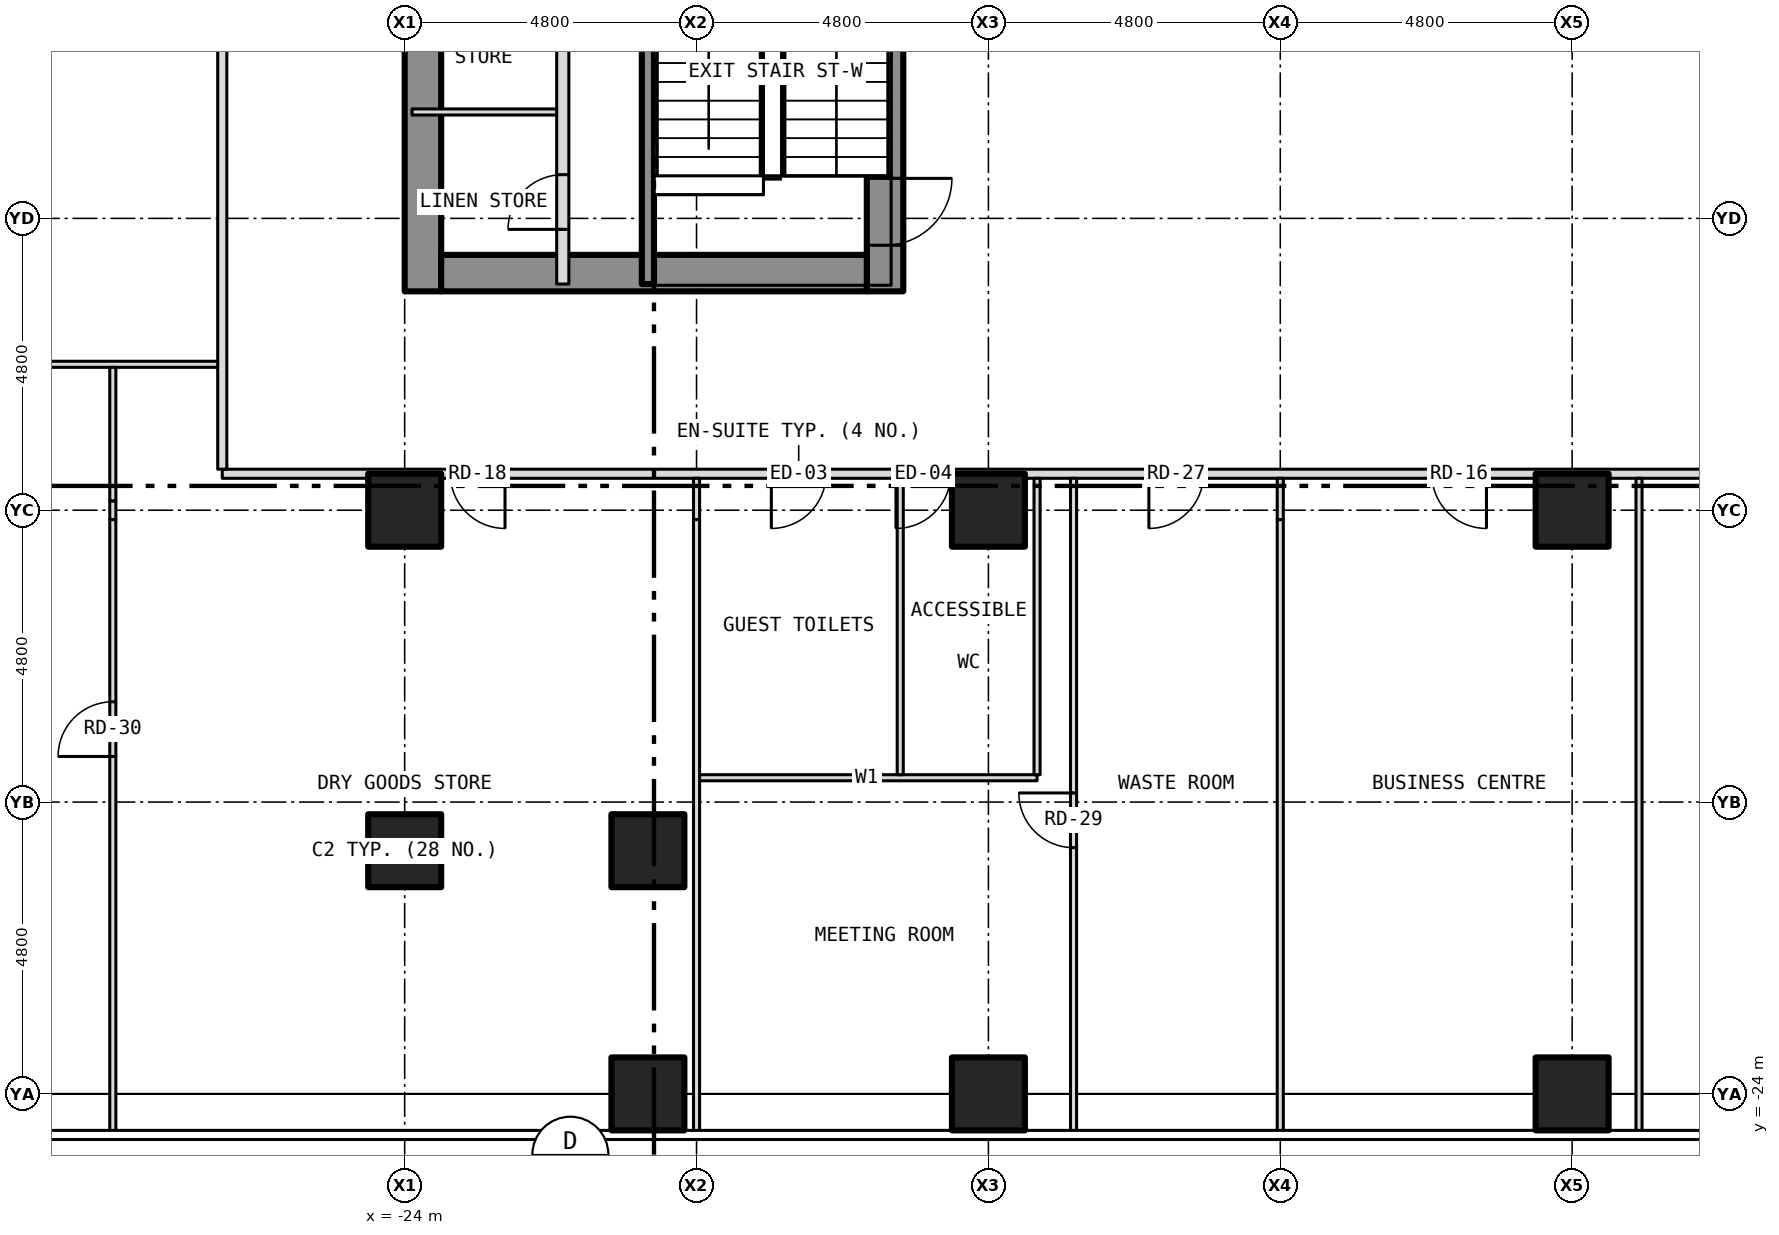
"""IFC4 building model, lengths in metres.
Left out: names, types, materials, properties, quantities, classifications, styles, units other than length and angle.
Written with IfcOpenShell. Run it as: python <this file> out.ifc"""

import sys

from ifc_helpers import new_model, si_unit, direction, frame, frame_2d, origin, origin_2d, place, context, subcontext, project, spatial, rectangle, hollow_rectangle, extrude, element, fill, save


model = new_model("IFC4")
c1 = context("Model", 3, precision=1e-05, world=origin(), true_north=direction((0.0, 1.0)))
c2 = subcontext(c1, "Body", "Model", "MODEL_VIEW")
j1 = project(units=[si_unit("LENGTHUNIT", "METRE"), si_unit("PLANEANGLEUNIT", "RADIAN")], contexts=[c1])
p1 = place(None, origin())
s1 = spatial("IfcSite", under=j1, at=p1, CompositionType="ELEMENT")
p2 = place(p1, origin())
s2 = spatial("IfcBuilding", under=s1, at=p2, CompositionType="ELEMENT")
p3 = place(p2, frame((0.0, 0.0, 7.5)))
s3 = spatial("IfcBuildingStorey", under=s2, at=p3, CompositionType="ELEMENT", Elevation=7.5)
for number, where, z_axis, x_axis in (
    (1, (-20.0, -24.0, -0.25), (0.0, 0.0, 1.0), (1.0, 0.0, 0.0)),
    (2, (-14.4, -24.0, -0.25), (0.0, 0.0, 1.0), (1.0, 0.0, 0.0)),
    (3, (-4.8, -24.0, -0.25), (0.0, 0.0, 1.0), (1.0, 0.0, 0.0)),
    (4, (-24.0, -20.0, -0.25), (0.0, 0.0, 1.0), (1.0, 0.0, 0.0)),
    (5, (-24.0, -14.4, -0.25), (0.0, 0.0, 1.0), (1.0, 0.0, 0.0)),
    (6, (-20.0, -20.0, -0.25), (0.0, 0.0, 1.0), (1.0, 0.0, 0.0)),
    (7, (-14.4, -14.4, -0.25), (0.0, 0.0, 1.0), (1.0, 0.0, 0.0)),
    (8, (-4.8, -14.4, -0.25), (0.0, 0.0, 1.0), (1.0, 0.0, 0.0)),
):
    element("IfcColumn", number, at=place(p3, frame(where, z_axis=z_axis, x_axis=x_axis)), inside=s3, PredefinedType="COLUMN", context=c2, shape_type="SweptSolid", body=[
        extrude(hollow_rectangle(XDim=1.2, YDim=1.2, WallThickness=0.07, at=origin_2d()), origin(), (0.0, 0.0, 1.0), 8.05),
    ])
p4 = place(p3, frame((-16.1, -10.8, 0.0), z_axis=(0.0, 0.0, 1.0), x_axis=(0.0, 1.0, 0.0)))
e9 = element("IfcWall", 9, at=p4, inside=s3, PredefinedType="SHEAR", context=c2, shape_type="SweptSolid", body=[
    extrude(rectangle(XDim=21.6, YDim=0.6, at=frame_2d((10.8, 0.0))), origin(), (0.0, 0.0, 1.0), 7.7),
])
p5 = place(p4, frame((9.4, 0.0, 0.0)))
e10 = element("IfcOpeningElement", 10, at=p5, cuts=e9, PredefinedType="OPENING", context=c2, shape_type="SweptSolid", body=[
    extrude(rectangle(XDim=1.1, YDim=2.1, at=frame_2d((0.55, 1.05))), frame((0.0, 0.312, 0.0), z_axis=(0.0, -1.0, 0.0), x_axis=(1.0, 0.0, 0.0)), (0.0, 0.0, 1.0), 0.624),
])
p6 = place(p4, frame((11.5, 0.0, 0.0)))
e11 = element("IfcOpeningElement", 11, at=p6, cuts=e9, PredefinedType="OPENING", context=c2, shape_type="SweptSolid", body=[
    extrude(rectangle(XDim=1.1, YDim=2.1, at=frame_2d((0.55, 1.05))), frame((0.0, 0.312, 0.0), z_axis=(0.0, -1.0, 0.0), x_axis=(1.0, 0.0, 0.0)), (0.0, 0.0, 1.0), 0.624),
])
p7 = place(p4, frame((13.6, 0.0, 0.0)))
e12 = element("IfcOpeningElement", 12, at=p7, cuts=e9, PredefinedType="OPENING", context=c2, shape_type="SweptSolid", body=[
    extrude(rectangle(XDim=1.1, YDim=2.1, at=frame_2d((0.55, 1.05))), frame((0.0, 0.312, 0.0), z_axis=(0.0, -1.0, 0.0), x_axis=(1.0, 0.0, 0.0)), (0.0, 0.0, 1.0), 0.624),
])
p8 = place(p4, frame((15.7, 0.0, 0.0)))
e13 = element("IfcOpeningElement", 13, at=p8, cuts=e9, PredefinedType="OPENING", context=c2, shape_type="SweptSolid", body=[
    extrude(rectangle(XDim=1.1, YDim=2.1, at=frame_2d((0.55, 1.05))), frame((0.0, 0.312, 0.0), z_axis=(0.0, -1.0, 0.0), x_axis=(1.0, 0.0, 0.0)), (0.0, 0.0, 1.0), 0.624),
])
p9 = place(p4, frame((17.8, 0.0, 0.0)))
e14 = element("IfcOpeningElement", 14, at=p9, cuts=e9, PredefinedType="OPENING", context=c2, shape_type="SweptSolid", body=[
    extrude(rectangle(XDim=1.1, YDim=2.1, at=frame_2d((0.55, 1.05))), frame((0.0, 0.312, 0.0), z_axis=(0.0, -1.0, 0.0), x_axis=(1.0, 0.0, 0.0)), (0.0, 0.0, 1.0), 0.624),
])
p10 = place(p4, frame((0.758, 0.0, 0.0)))
e15 = element("IfcOpeningElement", 15, at=p10, cuts=e9, PredefinedType="OPENING", context=c2, shape_type="SweptSolid", body=[
    extrude(rectangle(XDim=1.1, YDim=2.1, at=frame_2d((0.55, 1.05))), frame((0.0, 0.312, 0.0), z_axis=(0.0, -1.0, 0.0), x_axis=(1.0, 0.0, 0.0)), (0.0, 0.0, 1.0), 0.624),
])
p11 = place(p4, frame((7.5, 0.0, 0.0)))
e16 = element("IfcOpeningElement", 16, at=p11, cuts=e9, PredefinedType="OPENING", context=c2, shape_type="SweptSolid", body=[
    extrude(rectangle(XDim=1.1, YDim=2.1, at=frame_2d((0.55, 1.05))), frame((0.0, 0.312, 0.0), z_axis=(0.0, -1.0, 0.0), x_axis=(1.0, 0.0, 0.0)), (0.0, 0.0, 1.0), 0.624),
])
p12 = place(p3, frame((-23.7, -10.8, 0.0), z_axis=(0.0, 0.0, 1.0), x_axis=(0.0, 1.0, 0.0)))
e17 = element("IfcWall", 17, at=p12, inside=s3, PredefinedType="SHEAR", context=c2, shape_type="SweptSolid", body=[
    extrude(rectangle(XDim=21.6, YDim=0.6, at=frame_2d((10.8, 0.0))), origin(), (0.0, 0.0, 1.0), 7.7),
])
p13 = place(p3, frame((-23.4, -10.5, 0.0), z_axis=(0.0, 0.0, 1.0), x_axis=(1.0, 0.0, 0.0)))
e18 = element("IfcWall", 18, at=p13, inside=s3, PredefinedType="SHEAR", context=c2, shape_type="SweptSolid", body=[
    extrude(rectangle(XDim=7.0, YDim=0.6, at=frame_2d((3.5, 0.0))), origin(), (0.0, 0.0, 1.0), 7.7),
])
p14 = place(p3, frame((-19.2, -18.8, 0.0), z_axis=(0.0, 0.0, 1.0), x_axis=(1.0, 0.0, 0.0)))
e19 = element("IfcWall", 19, at=p14, inside=s3, PredefinedType="PARTITIONING", context=c2, shape_type="SweptSolid", body=[
    extrude(rectangle(XDim=5.6, YDim=0.1, at=frame_2d((2.8, 0.0))), origin(), (0.0, 0.0, 1.0), 7.8),
])
p15 = place(p3, frame((-27.0, -13.8, 0.0), z_axis=(0.0, 0.0, 1.0), x_axis=(1.0, 0.0, 0.0)))
e20 = element("IfcWall", 20, at=p15, inside=s3, PredefinedType="PARTITIONING", context=c2, shape_type="SweptSolid", body=[
    extrude(rectangle(XDim=54.0, YDim=0.15, at=frame_2d((27.0, 0.0))), origin(), (0.0, 0.0, 1.0), 7.8),
])
p16 = place(p15, frame((9.03, 0.0, 0.0)))
e21 = element("IfcOpeningElement", 21, at=p16, cuts=e20, PredefinedType="OPENING", context=c2, shape_type="SweptSolid", body=[
    extrude(rectangle(XDim=0.9, YDim=2.1, at=frame_2d((0.45, 1.05))), frame((0.0, 0.087, 0.0), z_axis=(0.0, -1.0, 0.0), x_axis=(1.0, 0.0, 0.0)), (0.0, 0.0, 1.0), 0.174),
])
p17 = place(p15, frame((11.08, 0.0, 0.0)))
e22 = element("IfcOpeningElement", 22, at=p17, cuts=e20, PredefinedType="OPENING", context=c2, shape_type="SweptSolid", body=[
    extrude(rectangle(XDim=0.9, YDim=2.1, at=frame_2d((0.45, 1.05))), frame((0.0, 0.087, 0.0), z_axis=(0.0, -1.0, 0.0), x_axis=(1.0, 0.0, 0.0)), (0.0, 0.0, 1.0), 0.174),
])
p18 = place(p15, frame((19.891, 0.0, 0.0)))
e23 = element("IfcOpeningElement", 23, at=p18, cuts=e20, PredefinedType="OPENING", context=c2, shape_type="SweptSolid", body=[
    extrude(rectangle(XDim=0.9, YDim=2.1, at=frame_2d((0.45, 1.05))), frame((0.0, 0.087, 0.0), z_axis=(0.0, -1.0, 0.0), x_axis=(1.0, 0.0, 0.0)), (0.0, 0.0, 1.0), 0.174),
])
p19 = place(p15, frame((30.274, 0.0, 0.0)))
e24 = element("IfcOpeningElement", 24, at=p19, cuts=e20, PredefinedType="OPENING", context=c2, shape_type="SweptSolid", body=[
    extrude(rectangle(XDim=0.9, YDim=2.1, at=frame_2d((0.45, 1.05))), frame((0.0, 0.087, 0.0), z_axis=(0.0, -1.0, 0.0), x_axis=(1.0, 0.0, 0.0)), (0.0, 0.0, 1.0), 0.174),
])
p20 = place(p15, frame((3.75, 0.0, 0.0)))
e25 = element("IfcOpeningElement", 25, at=p20, cuts=e20, PredefinedType="OPENING", context=c2, shape_type="SweptSolid", body=[
    extrude(rectangle(XDim=0.9, YDim=2.1, at=frame_2d((0.45, 1.05))), frame((0.0, 0.087, 0.0), z_axis=(0.0, -1.0, 0.0), x_axis=(1.0, 0.0, 0.0)), (0.0, 0.0, 1.0), 0.174),
])
p21 = place(p15, frame((49.35, 0.0, 0.0)))
e26 = element("IfcOpeningElement", 26, at=p21, cuts=e20, PredefinedType="OPENING", context=c2, shape_type="SweptSolid", body=[
    extrude(rectangle(XDim=0.9, YDim=2.1, at=frame_2d((0.45, 1.05))), frame((0.0, 0.087, 0.0), z_axis=(0.0, -1.0, 0.0), x_axis=(1.0, 0.0, 0.0)), (0.0, 0.0, 1.0), 0.174),
])
p22 = place(p15, frame((42.15, 0.0, 0.0)))
e27 = element("IfcOpeningElement", 27, at=p22, cuts=e20, PredefinedType="OPENING", context=c2, shape_type="SweptSolid", body=[
    extrude(rectangle(XDim=0.9, YDim=2.1, at=frame_2d((0.45, 1.05))), frame((0.0, 0.087, 0.0), z_axis=(0.0, -1.0, 0.0), x_axis=(1.0, 0.0, 0.0)), (0.0, 0.0, 1.0), 0.174),
])
p23 = place(p15, frame((15.239, 0.0, 0.0)))
e28 = element("IfcOpeningElement", 28, at=p23, cuts=e20, PredefinedType="OPENING", context=c2, shape_type="SweptSolid", body=[
    extrude(rectangle(XDim=0.9, YDim=2.1, at=frame_2d((0.45, 1.05))), frame((0.0, 0.087, 0.0), z_axis=(0.0, -1.0, 0.0), x_axis=(1.0, 0.0, 0.0)), (0.0, 0.0, 1.0), 0.174),
])
p24 = place(p3, frame((-38.28, -12.0, 0.0), z_axis=(0.0, 0.0, 1.0), x_axis=(1.0, 0.0, 0.0)))
e29 = element("IfcWall", 29, at=p24, inside=s3, PredefinedType="PARTITIONING", context=c2, shape_type="SweptSolid", body=[
    extrude(rectangle(XDim=11.28, YDim=0.1, at=frame_2d((5.64, 0.0))), origin(), (0.0, 0.0, 1.0), 7.8),
])
p25 = place(p3, frame((-23.88, -7.85, 0.0), z_axis=(0.0, 0.0, 1.0), x_axis=(1.0, 0.0, 0.0)))
e30 = element("IfcWall", 30, at=p25, inside=s3, PredefinedType="PARTITIONING", context=c2, shape_type="SweptSolid", body=[
    extrude(rectangle(XDim=2.48, YDim=0.1, at=frame_2d((1.24, 0.0))), origin(), (0.0, 0.0, 1.0), 7.7),
])
p26 = place(p3, frame((-28.8, -24.63, 0.0), z_axis=(0.0, 0.0, 1.0), x_axis=(0.0, 1.0, 0.0)))
e31 = element("IfcWall", 31, at=p26, inside=s3, PredefinedType="PARTITIONING", context=c2, shape_type="SweptSolid", body=[
    extrude(rectangle(XDim=10.076, YDim=0.1, at=frame_2d((5.038, 0.0))), origin(), (0.0, 0.0, 1.0), 7.183),
])
p27 = place(p26, frame((6.18, 0.0, 0.0)))
e32 = element("IfcOpeningElement", 32, at=p27, cuts=e31, PredefinedType="OPENING", context=c2, shape_type="SweptSolid", body=[
    extrude(rectangle(XDim=0.9, YDim=2.1, at=frame_2d((0.45, 1.05))), frame((0.0, 0.062, 0.0), z_axis=(0.0, -1.0, 0.0), x_axis=(1.0, 0.0, 0.0)), (0.0, 0.0, 1.0), 0.124),
])
p28 = place(p3, frame((-28.8, -14.554, 0.0), z_axis=(0.0, 0.0, 1.0), x_axis=(0.0, 1.0, 0.0)))
e33 = element("IfcWall", 33, at=p28, inside=s3, PredefinedType="PARTITIONING", context=c2, shape_type="SweptSolid", body=[
    extrude(rectangle(XDim=0.308, YDim=0.1, at=frame_2d((0.154, 0.0))), origin(), (0.0, 0.0, 1.0), 7.8),
])
p29 = place(p3, frame((-28.8, -14.246, 0.0), z_axis=(0.0, 0.0, 1.0), x_axis=(0.0, 1.0, 0.0)))
e34 = element("IfcWall", 34, at=p29, inside=s3, PredefinedType="PARTITIONING", context=c2, shape_type="SweptSolid", body=[
    extrude(rectangle(XDim=2.196, YDim=0.1, at=frame_2d((1.098, 0.0))), origin(), (0.0, 0.0, 1.0), 7.183),
])
p30 = place(p3, frame((-27.0, -13.725, 0.0), z_axis=(0.0, 0.0, 1.0), x_axis=(0.0, 1.0, 0.0)))
e35 = element("IfcWall", 35, at=p30, inside=s3, PredefinedType="PARTITIONING", context=c2, shape_type="SweptSolid", body=[
    extrude(rectangle(XDim=27.45, YDim=0.15, at=frame_2d((13.725, 0.0))), origin(), (0.0, 0.0, 1.0), 7.8),
])
p31 = place(p30, frame((7.275, 0.0, 0.0)))
e36 = element("IfcOpeningElement", 36, at=p31, cuts=e35, PredefinedType="OPENING", context=c2, shape_type="SweptSolid", body=[
    extrude(rectangle(XDim=0.9, YDim=2.1, at=frame_2d((0.45, 1.05))), frame((0.0, 0.087, 0.0), z_axis=(0.0, -1.0, 0.0), x_axis=(1.0, 0.0, 0.0)), (0.0, 0.0, 1.0), 0.174),
])
p32 = place(p30, frame((19.275, 0.0, 0.0)))
e37 = element("IfcOpeningElement", 37, at=p32, cuts=e35, PredefinedType="OPENING", context=c2, shape_type="SweptSolid", body=[
    extrude(rectangle(XDim=0.9, YDim=2.1, at=frame_2d((0.45, 1.05))), frame((0.0, 0.087, 0.0), z_axis=(0.0, -1.0, 0.0), x_axis=(1.0, 0.0, 0.0)), (0.0, 0.0, 1.0), 0.174),
])
p33 = place(p3, frame((-21.4, -10.68, 0.0), z_axis=(0.0, 0.0, 1.0), x_axis=(0.0, 1.0, 0.0)))
e38 = element("IfcWall", 38, at=p33, inside=s3, PredefinedType="PARTITIONING", context=c2, shape_type="SweptSolid", body=[
    extrude(rectangle(XDim=8.68, YDim=0.2, at=frame_2d((4.34, 0.0))), origin(), (0.0, 0.0, 1.0), 7.7),
])
p34 = place(p33, frame((0.899, 0.0, 0.0)))
e39 = element("IfcOpeningElement", 39, at=p34, cuts=e38, PredefinedType="OPENING", context=c2, shape_type="SweptSolid", body=[
    extrude(rectangle(XDim=0.9, YDim=2.1, at=frame_2d((0.45, 1.05))), frame((0.0, 0.112, 0.0), z_axis=(0.0, -1.0, 0.0), x_axis=(1.0, 0.0, 0.0)), (0.0, 0.0, 1.0), 0.224),
])
p35 = place(p33, frame((3.88, 0.0, 0.0)))
e40 = element("IfcOpeningElement", 40, at=p35, cuts=e38, PredefinedType="OPENING", context=c2, shape_type="SweptSolid", body=[
    extrude(rectangle(XDim=0.9, YDim=2.1, at=frame_2d((0.45, 1.05))), frame((0.0, 0.112, 0.0), z_axis=(0.0, -1.0, 0.0), x_axis=(1.0, 0.0, 0.0)), (0.0, 0.0, 1.0), 0.224),
])
p36 = place(p33, frame((6.862, 0.0, 0.0)))
e41 = element("IfcOpeningElement", 41, at=p36, cuts=e38, PredefinedType="OPENING", context=c2, shape_type="SweptSolid", body=[
    extrude(rectangle(XDim=0.9, YDim=2.1, at=frame_2d((0.45, 1.05))), frame((0.0, 0.112, 0.0), z_axis=(0.0, -1.0, 0.0), x_axis=(1.0, 0.0, 0.0)), (0.0, 0.0, 1.0), 0.224),
])
p37 = place(p3, frame((-20.0, -10.68, 0.0), z_axis=(0.0, 0.0, 1.0), x_axis=(0.0, 1.0, 0.0)))
e42 = element("IfcWall", 42, at=p37, inside=s3, PredefinedType="SHEAR", context=c2, shape_type="SweptSolid", body=[
    extrude(rectangle(XDim=6.98, YDim=0.2, at=frame_2d((3.49, 0.0))), origin(), (0.0, 0.0, 1.0), 7.7),
])
p38 = place(p3, frame((-19.2, -24.63, 0.0), z_axis=(0.0, 0.0, 1.0), x_axis=(0.0, 1.0, 0.0)))
e43 = element("IfcWall", 43, at=p38, inside=s3, PredefinedType="PARTITIONING", context=c2, shape_type="SweptSolid", body=[
    extrude(rectangle(XDim=10.076, YDim=0.1, at=frame_2d((5.038, 0.0))), origin(), (0.0, 0.0, 1.0), 7.183),
])
p39 = place(p3, frame((-19.2, -14.554, 0.0), z_axis=(0.0, 0.0, 1.0), x_axis=(0.0, 1.0, 0.0)))
e44 = element("IfcWall", 44, at=p39, inside=s3, PredefinedType="PARTITIONING", context=c2, shape_type="SweptSolid", body=[
    extrude(rectangle(XDim=0.679, YDim=0.1, at=frame_2d((0.339, 0.0))), origin(), (0.0, 0.0, 1.0), 7.8),
])
for number, where, z_axis, x_axis in (
    (45, (-15.85, -18.75, 0.0), (0.0, 0.0, 1.0), (0.0, 1.0, 0.0)),
    (46, (-13.6, -18.75, 0.0), (0.0, 0.0, 1.0), (0.0, 1.0, 0.0)),
):
    element("IfcWall", number, at=place(p3, frame(where, z_axis=z_axis, x_axis=x_axis)), inside=s3, PredefinedType="PARTITIONING", context=c2, shape_type="SweptSolid", body=[
        extrude(rectangle(XDim=4.875, YDim=0.1, at=frame_2d((2.438, 0.0))), origin(), (0.0, 0.0, 1.0), 7.8),
    ])
p40 = place(p3, frame((-13.0, -24.63, 0.0), z_axis=(0.0, 0.0, 1.0), x_axis=(0.0, 1.0, 0.0)))
e47 = element("IfcWall", 47, at=p40, inside=s3, PredefinedType="PARTITIONING", context=c2, shape_type="SweptSolid", body=[
    extrude(rectangle(XDim=10.755, YDim=0.1, at=frame_2d((5.377, 0.0))), origin(), (0.0, 0.0, 1.0), 7.8),
])
p41 = place(p40, frame((4.68, 0.0, 0.0)))
e48 = element("IfcOpeningElement", 48, at=p41, cuts=e47, PredefinedType="OPENING", context=c2, shape_type="SweptSolid", body=[
    extrude(rectangle(XDim=0.9, YDim=2.1, at=frame_2d((0.45, 1.05))), frame((0.0, 0.062, 0.0), z_axis=(0.0, -1.0, 0.0), x_axis=(1.0, 0.0, 0.0)), (0.0, 0.0, 1.0), 0.124),
])
p42 = place(p3, frame((-9.6, -24.63, 0.0), z_axis=(0.0, 0.0, 1.0), x_axis=(0.0, 1.0, 0.0)))
e49 = element("IfcWall", 49, at=p42, inside=s3, PredefinedType="PARTITIONING", context=c2, shape_type="SweptSolid", body=[
    extrude(rectangle(XDim=10.076, YDim=0.1, at=frame_2d((5.038, 0.0))), origin(), (0.0, 0.0, 1.0), 7.183),
])
p43 = place(p3, frame((-9.6, -14.554, 0.0), z_axis=(0.0, 0.0, 1.0), x_axis=(0.0, 1.0, 0.0)))
e50 = element("IfcWall", 50, at=p43, inside=s3, PredefinedType="PARTITIONING", context=c2, shape_type="SweptSolid", body=[
    extrude(rectangle(XDim=0.679, YDim=0.1, at=frame_2d((0.339, 0.0))), origin(), (0.0, 0.0, 1.0), 7.8),
])
p44 = place(p3, frame((-3.7, -24.63, 0.0), z_axis=(0.0, 0.0, 1.0), x_axis=(0.0, 1.0, 0.0)))
e51 = element("IfcWall", 51, at=p44, inside=s3, PredefinedType="PARTITIONING", context=c2, shape_type="SweptSolid", body=[
    extrude(rectangle(XDim=10.755, YDim=0.1, at=frame_2d((5.377, 0.0))), origin(), (0.0, 0.0, 1.0), 7.8),
])
p45 = place(p10, origin())
e52 = element("IfcDoor", 52, at=p45, inside=s3, OperationType="SINGLE_SWING_RIGHT", PredefinedType="DOOR", context=c2, shape_type="SweptSolid", body=[
    extrude(rectangle(XDim=1.1, YDim=2.1, at=frame_2d((0.55, 1.05))), frame((0.0, 0.025, 0.0), z_axis=(0.0, -1.0, 0.0), x_axis=(1.0, 0.0, 0.0)), (0.0, 0.0, 1.0), 0.05),
])
fill(e15, e52)
p46 = place(p34, origin())
e53 = element("IfcDoor", 53, at=p46, inside=s3, OperationType="SINGLE_SWING_LEFT", PredefinedType="DOOR", context=c2, shape_type="SweptSolid", body=[
    extrude(rectangle(XDim=0.9, YDim=2.1, at=frame_2d((0.45, 1.05))), frame((0.0, 0.025, 0.0), z_axis=(0.0, -1.0, 0.0), x_axis=(1.0, 0.0, 0.0)), (0.0, 0.0, 1.0), 0.05),
])
fill(e39, e53)
p47 = place(p16, origin())
e54 = element("IfcDoor", 54, at=p47, inside=s3, OperationType="SINGLE_SWING_LEFT", PredefinedType="DOOR", context=c2, shape_type="SweptSolid", body=[
    extrude(rectangle(XDim=0.9, YDim=2.1, at=frame_2d((0.45, 1.05))), frame((0.0, 0.025, 0.0), z_axis=(0.0, -1.0, 0.0), x_axis=(1.0, 0.0, 0.0)), (0.0, 0.0, 1.0), 0.05),
])
fill(e21, e54)
p48 = place(p17, origin())
e55 = element("IfcDoor", 55, at=p48, inside=s3, OperationType="SINGLE_SWING_LEFT", PredefinedType="DOOR", context=c2, shape_type="SweptSolid", body=[
    extrude(rectangle(XDim=0.9, YDim=2.1, at=frame_2d((0.45, 1.05))), frame((0.0, 0.025, 0.0), z_axis=(0.0, -1.0, 0.0), x_axis=(1.0, 0.0, 0.0)), (0.0, 0.0, 1.0), 0.05),
])
fill(e22, e55)
p49 = place(p18, origin())
e56 = element("IfcDoor", 56, at=p49, inside=s3, OperationType="SINGLE_SWING_RIGHT", PredefinedType="DOOR", context=c2, shape_type="SweptSolid", body=[
    extrude(rectangle(XDim=0.9, YDim=2.1, at=frame_2d((0.45, 1.05))), frame((0.0, 0.025, 0.0), z_axis=(0.0, -1.0, 0.0), x_axis=(1.0, 0.0, 0.0)), (0.0, 0.0, 1.0), 0.05),
])
fill(e23, e56)
p50 = place(p20, origin())
e57 = element("IfcDoor", 57, at=p50, inside=s3, OperationType="SINGLE_SWING_RIGHT", PredefinedType="DOOR", context=c2, shape_type="SweptSolid", body=[
    extrude(rectangle(XDim=0.9, YDim=2.1, at=frame_2d((0.45, 1.05))), frame((0.0, 0.025, 0.0), z_axis=(0.0, -1.0, 0.0), x_axis=(1.0, 0.0, 0.0)), (0.0, 0.0, 1.0), 0.05),
])
fill(e25, e57)
p51 = place(p23, origin())
e58 = element("IfcDoor", 58, at=p51, inside=s3, OperationType="SINGLE_SWING_LEFT", PredefinedType="DOOR", context=c2, shape_type="SweptSolid", body=[
    extrude(rectangle(XDim=0.9, YDim=2.1, at=frame_2d((0.45, 1.05))), frame((0.0, 0.025, 0.0), z_axis=(0.0, -1.0, 0.0), x_axis=(1.0, 0.0, 0.0)), (0.0, 0.0, 1.0), 0.05),
])
fill(e28, e58)
p52 = place(p41, origin())
e59 = element("IfcDoor", 59, at=p52, inside=s3, OperationType="SINGLE_SWING_RIGHT", PredefinedType="DOOR", context=c2, shape_type="SweptSolid", body=[
    extrude(rectangle(XDim=0.9, YDim=2.1, at=frame_2d((0.45, 1.05))), frame((0.0, 0.025, 0.0), z_axis=(0.0, -1.0, 0.0), x_axis=(1.0, 0.0, 0.0)), (0.0, 0.0, 1.0), 0.05),
])
fill(e48, e59)
p53 = place(p27, origin())
e60 = element("IfcDoor", 60, at=p53, inside=s3, OperationType="SINGLE_SWING_LEFT", PredefinedType="DOOR", context=c2, shape_type="SweptSolid", body=[
    extrude(rectangle(XDim=0.9, YDim=2.1, at=frame_2d((0.45, 1.05))), frame((0.0, 0.025, 0.0), z_axis=(0.0, -1.0, 0.0), x_axis=(1.0, 0.0, 0.0)), (0.0, 0.0, 1.0), 0.05),
])
fill(e32, e60)
save(model, sys.argv[1])
